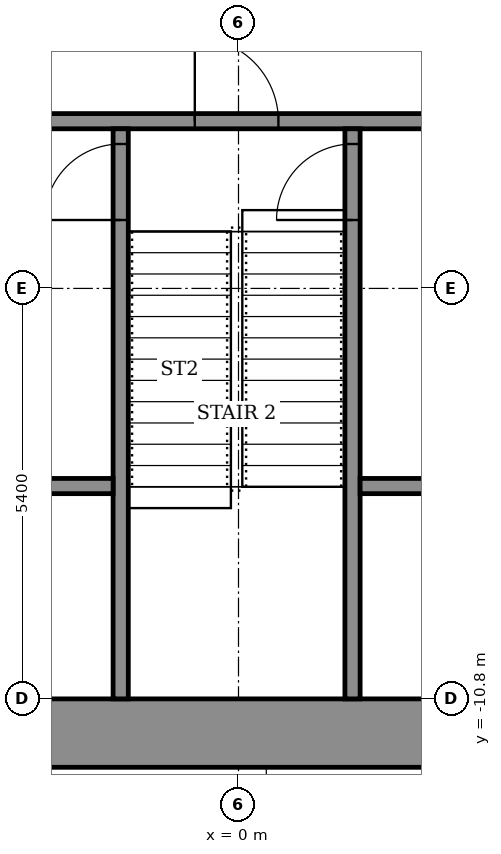
"""IFC4 building model, lengths in metres.
Left out: names, types, materials, properties, quantities, classifications, styles, units other than length and angle.
Written with IfcOpenShell. Run it as: python <this file> out.ifc"""

import sys

from ifc_helpers import new_model, si_unit, direction, frame, frame_2d, origin, place, context, subcontext, project, spatial, rectangle, extrude, element, fill, save


model = new_model("IFC4")
c1 = context("Model", 3, precision=1e-05, world=origin(), true_north=direction((0.0, 1.0)))
c2 = subcontext(c1, "Body", "Model", "MODEL_VIEW")
j1 = project(units=[si_unit("LENGTHUNIT", "METRE"), si_unit("PLANEANGLEUNIT", "RADIAN")], contexts=[c1])
p1 = place(None, origin())
s1 = spatial("IfcSite", under=j1, at=p1, CompositionType="ELEMENT")
p2 = place(p1, origin())
s2 = spatial("IfcBuilding", under=s1, at=p2, CompositionType="ELEMENT")
p3 = place(p2, frame((0.0, 0.0, 148.1)))
s3 = spatial("IfcBuildingStorey", under=s2, at=p3, CompositionType="ELEMENT", Elevation=148.1)
p4 = place(p3, frame((-14.7, -11.25, 0.0), z_axis=(0.0, 0.0, 1.0), x_axis=(1.0, 0.0, 0.0)))
e1 = element("IfcWall", 1, at=p4, inside=s3, PredefinedType="SHEAR", context=c2, shape_type="SweptSolid", body=[
    extrude(rectangle(XDim=29.4, YDim=0.9, at=frame_2d((14.7, 0.0))), origin(), (0.0, 0.0, 1.0), 4.6),
])
p5 = place(p3, frame((-10.9, -3.2, 0.0), z_axis=(0.0, 0.0, 1.0), x_axis=(1.0, 0.0, 0.0)))
e2 = element("IfcWall", 2, at=p5, inside=s3, PredefinedType="SHEAR", context=c2, shape_type="SweptSolid", body=[
    extrude(rectangle(XDim=21.8, YDim=0.2, at=frame_2d((10.9, 0.0))), origin(), (0.0, 0.0, 1.0), 4.05),
])
p6 = place(p5, frame((1.075, 0.0, 0.0)))
e3 = element("IfcOpeningElement", 3, at=p6, cuts=e2, PredefinedType="OPENING", context=c2, shape_type="SweptSolid", body=[
    extrude(rectangle(XDim=1.1, YDim=2.1, at=frame_2d((0.55, 1.05))), frame((0.0, 0.11, 0.0), z_axis=(0.0, -1.0, 0.0), x_axis=(1.0, 0.0, 0.0)), (0.0, 0.0, 1.0), 0.22),
])
p7 = place(p5, frame((10.325, 0.0, 0.0)))
e4 = element("IfcOpeningElement", 4, at=p7, cuts=e2, PredefinedType="OPENING", context=c2, shape_type="SweptSolid", body=[
    extrude(rectangle(XDim=1.1, YDim=2.1, at=frame_2d((0.55, 1.05))), frame((0.0, 0.11, 0.0), z_axis=(0.0, -1.0, 0.0), x_axis=(1.0, 0.0, 0.0)), (0.0, 0.0, 1.0), 0.22),
])
p8 = place(p5, frame((19.625, 0.0, 0.0)))
e5 = element("IfcOpeningElement", 5, at=p8, cuts=e2, PredefinedType="OPENING", context=c2, shape_type="SweptSolid", body=[
    extrude(rectangle(XDim=1.1, YDim=2.1, at=frame_2d((0.55, 1.05))), frame((0.0, 0.11, 0.0), z_axis=(0.0, -1.0, 0.0), x_axis=(1.0, 0.0, 0.0)), (0.0, 0.0, 1.0), 0.22),
])
p9 = place(p5, frame((5.7, 0.0, 0.0)))
e6 = element("IfcOpeningElement", 6, at=p9, cuts=e2, PredefinedType="OPENING", context=c2, shape_type="SweptSolid", body=[
    extrude(rectangle(XDim=1.1, YDim=2.1, at=frame_2d((0.55, 1.05))), frame((0.0, 0.11, 0.0), z_axis=(0.0, -1.0, 0.0), x_axis=(1.0, 0.0, 0.0)), (0.0, 0.0, 1.0), 0.22),
])
p10 = place(p5, frame((14.975, 0.0, 0.0)))
e7 = element("IfcOpeningElement", 7, at=p10, cuts=e2, PredefinedType="OPENING", context=c2, shape_type="SweptSolid", body=[
    extrude(rectangle(XDim=1.1, YDim=2.1, at=frame_2d((0.55, 1.05))), frame((0.0, 0.11, 0.0), z_axis=(0.0, -1.0, 0.0), x_axis=(1.0, 0.0, 0.0)), (0.0, 0.0, 1.0), 0.22),
])
p11 = place(p3, frame((-1.55, -10.8, 0.0), z_axis=(0.0, 0.0, 1.0), x_axis=(0.0, 1.0, 0.0)))
e8 = element("IfcWall", 8, at=p11, inside=s3, PredefinedType="SHEAR", context=c2, shape_type="SweptSolid", body=[
    extrude(rectangle(XDim=7.5, YDim=0.2, at=frame_2d((3.75, 0.0))), origin(), (0.0, 0.0, 1.0), 4.05),
])
p12 = place(p11, frame((6.3, 0.0, 0.0)))
e9 = element("IfcOpeningElement", 9, at=p12, cuts=e8, PredefinedType="OPENING", context=c2, shape_type="SweptSolid", body=[
    extrude(rectangle(XDim=1.0, YDim=2.1, at=frame_2d((0.5, 1.05))), frame((0.0, 0.11, 0.0), z_axis=(0.0, -1.0, 0.0), x_axis=(1.0, 0.0, 0.0)), (0.0, 0.0, 1.0), 0.22),
])
p13 = place(p3, frame((1.5, -10.8, 0.0), z_axis=(0.0, 0.0, 1.0), x_axis=(0.0, 1.0, 0.0)))
e10 = element("IfcWall", 10, at=p13, inside=s3, PredefinedType="SHEAR", context=c2, shape_type="SweptSolid", body=[
    extrude(rectangle(XDim=7.5, YDim=0.2, at=frame_2d((3.75, 0.0))), origin(), (0.0, 0.0, 1.0), 4.05),
])
p14 = place(p13, frame((6.3, 0.0, 0.0)))
e11 = element("IfcOpeningElement", 11, at=p14, cuts=e10, PredefinedType="OPENING", context=c2, shape_type="SweptSolid", body=[
    extrude(rectangle(XDim=1.0, YDim=2.1, at=frame_2d((0.5, 1.05))), frame((0.0, 0.11, 0.0), z_axis=(0.0, -1.0, 0.0), x_axis=(1.0, 0.0, 0.0)), (0.0, 0.0, 1.0), 0.22),
])
p15 = place(p3, frame((-7.65, -8.0, 0.0), z_axis=(0.0, 0.0, 1.0), x_axis=(1.0, 0.0, 0.0)))
e12 = element("IfcWall", 12, at=p15, inside=s3, PredefinedType="SHEAR", context=c2, shape_type="SweptSolid", body=[
    extrude(rectangle(XDim=6.0, YDim=0.2, at=frame_2d((3.0, 0.0))), origin(), (0.0, 0.0, 1.0), 4.05),
])
p16 = place(p15, frame((0.9, 0.0, 0.0)))
e13 = element("IfcOpeningElement", 13, at=p16, cuts=e12, PredefinedType="OPENING", context=c2, shape_type="SweptSolid", body=[
    extrude(rectangle(XDim=1.1, YDim=2.1, at=frame_2d((0.55, 1.05))), frame((0.0, 0.11, 0.0), z_axis=(0.0, -1.0, 0.0), x_axis=(1.0, 0.0, 0.0)), (0.0, 0.0, 1.0), 0.22),
])
p17 = place(p15, frame((4.0, 0.0, 0.0)))
e14 = element("IfcOpeningElement", 14, at=p17, cuts=e12, PredefinedType="OPENING", context=c2, shape_type="SweptSolid", body=[
    extrude(rectangle(XDim=1.1, YDim=2.1, at=frame_2d((0.55, 1.05))), frame((0.0, 0.11, 0.0), z_axis=(0.0, -1.0, 0.0), x_axis=(1.0, 0.0, 0.0)), (0.0, 0.0, 1.0), 0.22),
])
p18 = place(p3, frame((1.6, -8.0, 0.0), z_axis=(0.0, 0.0, 1.0), x_axis=(1.0, 0.0, 0.0)))
e15 = element("IfcWall", 15, at=p18, inside=s3, PredefinedType="SHEAR", context=c2, shape_type="SweptSolid", body=[
    extrude(rectangle(XDim=6.05, YDim=0.2, at=frame_2d((3.025, 0.0))), origin(), (0.0, 0.0, 1.0), 4.05),
])
p19 = place(p18, frame((0.913, 0.0, 0.0)))
e16 = element("IfcOpeningElement", 16, at=p19, cuts=e15, PredefinedType="OPENING", context=c2, shape_type="SweptSolid", body=[
    extrude(rectangle(XDim=1.1, YDim=2.1, at=frame_2d((0.55, 1.05))), frame((0.0, 0.11, 0.0), z_axis=(0.0, -1.0, 0.0), x_axis=(1.0, 0.0, 0.0)), (0.0, 0.0, 1.0), 0.22),
])
p20 = place(p18, frame((4.038, 0.0, 0.0)))
e17 = element("IfcOpeningElement", 17, at=p20, cuts=e15, PredefinedType="OPENING", context=c2, shape_type="SweptSolid", body=[
    extrude(rectangle(XDim=1.1, YDim=2.1, at=frame_2d((0.55, 1.05))), frame((0.0, 0.11, 0.0), z_axis=(0.0, -1.0, 0.0), x_axis=(1.0, 0.0, 0.0)), (0.0, 0.0, 1.0), 0.22),
])
p21 = place(p7, origin())
e18 = element("IfcDoor", 18, at=p21, inside=s3, OperationType="SINGLE_SWING_RIGHT", PredefinedType="DOOR", context=c2, shape_type="SweptSolid", body=[
    extrude(rectangle(XDim=1.1, YDim=2.1, at=frame_2d((0.55, 1.05))), frame((0.0, 0.025, 0.0), z_axis=(0.0, -1.0, 0.0), x_axis=(1.0, 0.0, 0.0)), (0.0, 0.0, 1.0), 0.05),
])
fill(e4, e18)
p22 = place(p12, origin())
e19 = element("IfcDoor", 19, at=p22, inside=s3, OperationType="SINGLE_SWING_RIGHT", PredefinedType="DOOR", context=c2, shape_type="SweptSolid", body=[
    extrude(rectangle(XDim=1.0, YDim=2.1, at=frame_2d((0.5, 1.05))), frame((0.0, 0.025, 0.0), z_axis=(0.0, -1.0, 0.0), x_axis=(1.0, 0.0, 0.0)), (0.0, 0.0, 1.0), 0.05),
])
fill(e9, e19)
p23 = place(p14, origin())
e20 = element("IfcDoor", 20, at=p23, inside=s3, OperationType="SINGLE_SWING_RIGHT", PredefinedType="DOOR", context=c2, shape_type="SweptSolid", body=[
    extrude(rectangle(XDim=1.0, YDim=2.1, at=frame_2d((0.5, 1.05))), frame((0.0, 0.025, 0.0), z_axis=(0.0, -1.0, 0.0), x_axis=(1.0, 0.0, 0.0)), (0.0, 0.0, 1.0), 0.05),
])
fill(e11, e20)
save(model, sys.argv[1])
